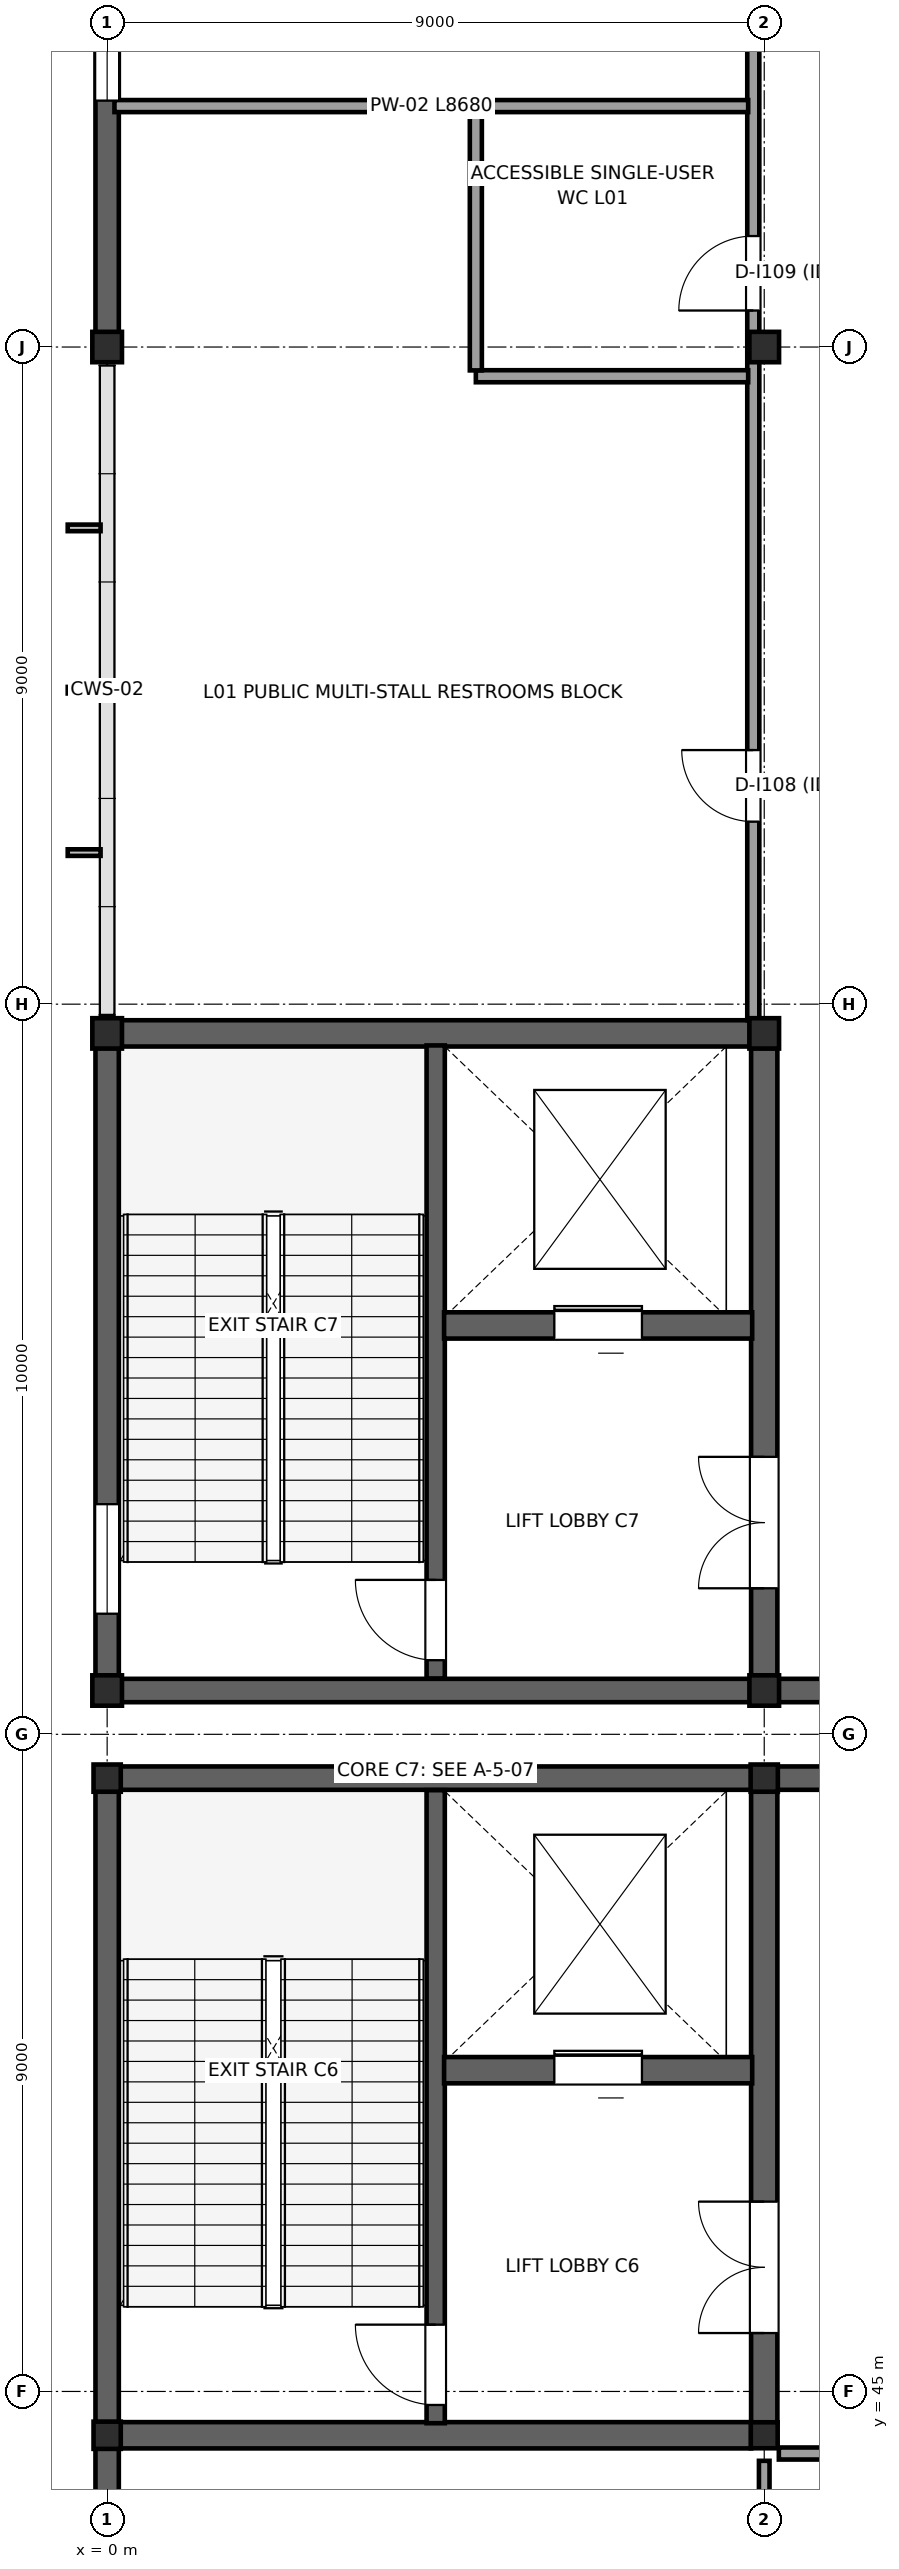
"""IFC4 building model, lengths in metres.
Left out: names, types, materials, properties, quantities, classifications, styles, units other than length and angle.
Written with IfcOpenShell. Run it as: python <this file> out.ifc"""

import sys

from ifc_helpers import new_model, si_unit, direction, frame, frame_2d, origin, origin_2d, place, context, subcontext, project, spatial, rectangle, i_section, extrude, element, fill, save


model = new_model("IFC4")
c1 = context("Model", 3, precision=1e-05, world=origin(), true_north=direction((0.0, 1.0)))
c2 = subcontext(c1, "Body", "Model", "MODEL_VIEW")
j1 = project(units=[si_unit("LENGTHUNIT", "METRE"), si_unit("PLANEANGLEUNIT", "RADIAN")], contexts=[c1])
p1 = place(None, origin())
s1 = spatial("IfcSite", under=j1, at=p1, CompositionType="ELEMENT")
p2 = place(p1, origin())
s2 = spatial("IfcBuilding", under=s1, at=p2, CompositionType="ELEMENT")
p3 = place(p2, frame((0.0, 0.0, 6.0)))
s3 = spatial("IfcBuildingStorey", under=s2, at=p3, CompositionType="ELEMENT", Elevation=6.0)
for number, where, z_axis, x_axis in (
    (1, (9.0, 53.4, 0.0), (0.0, 0.0, 1.0), (1.0, 0.0, 0.0)),
    (2, (0.0, 53.4, 0.0), (0.0, 0.0, 1.0), (1.0, 0.0, 0.0)),
    (3, (0.0, 44.4, 0.0), (0.0, 0.0, 1.0), (1.0, 0.0, 0.0)),
):
    element("IfcColumn", number, at=place(p3, frame(where, z_axis=z_axis, x_axis=x_axis)), inside=s3, PredefinedType="COLUMN", context=c2, shape_type="SweptSolid", body=[
        extrude(i_section(OverallWidth=0.373, OverallDepth=0.373, WebThickness=0.016, FlangeThickness=0.026, at=origin_2d()), origin(), (0.0, 0.0, 1.0), 6.0),
    ])
p4 = place(p3, frame((9.0, 44.4, 0.0), z_axis=(0.0, 0.0, 1.0), x_axis=(1.0, 0.0, 0.0)))
e4 = element("IfcColumn", 4, at=p4, inside=s3, PredefinedType="COLUMN", context=c2, shape_type="SweptSolid", body=[
    extrude(i_section(OverallWidth=0.368, OverallDepth=0.356, WebThickness=0.011, FlangeThickness=0.018, at=origin_2d()), origin(), (0.0, 0.0, 1.0), 6.0),
])
for number, where, z_axis, x_axis in (
    (5, (0.0, 54.6, 0.0), (0.0, 0.0, 1.0), (1.0, 0.0, 0.0)),
    (6, (0.0, 63.6, 0.0), (0.0, 0.0, 1.0), (1.0, 0.0, 0.0)),
    (7, (0.0, 73.0, 0.0), (0.0, 0.0, 1.0), (1.0, 0.0, 0.0)),
    (8, (9.0, 54.6, 0.0), (0.0, 0.0, 1.0), (1.0, 0.0, 0.0)),
    (9, (9.0, 63.6, 0.0), (0.0, 0.0, 1.0), (1.0, 0.0, 0.0)),
    (10, (9.0, 73.0, 0.0), (0.0, 0.0, 1.0), (1.0, 0.0, 0.0)),
):
    element("IfcColumn", number, at=place(p3, frame(where, z_axis=z_axis, x_axis=x_axis)), inside=s3, PredefinedType="COLUMN", context=c2, shape_type="SweptSolid", body=[
        extrude(i_section(OverallWidth=0.406, OverallDepth=0.416, WebThickness=0.03, FlangeThickness=0.048, at=origin_2d()), origin(), (0.0, 0.0, 1.0), 6.0),
    ])
p5 = place(p3, frame((0.0, 36.18, 0.0), z_axis=(0.0, 0.0, 1.0), x_axis=(0.0, 1.0, 0.0)))
e11 = element("IfcWall", 11, at=p5, inside=s3, PredefinedType="STANDARD", context=c2, shape_type="SweptSolid", body=[
    extrude(rectangle(XDim=8.04, YDim=0.32, at=frame_2d((4.02, 0.0))), origin(), (0.0, 0.0, 1.0), 5.75),
])
p6 = place(p3, frame((0.0, 44.58, 0.0), z_axis=(0.0, 0.0, 1.0), x_axis=(0.0, 1.0, 0.0)))
e12 = element("IfcWall", 12, at=p6, inside=s3, PredefinedType="STANDARD", context=c2, shape_type="SweptSolid", body=[
    extrude(rectangle(XDim=8.64, YDim=0.32, at=frame_2d((4.32, 0.0))), origin(), (0.0, 0.0, 1.0), 5.75),
])
for number, where, z_axis, x_axis in (
    (13, (0.015, 53.4, 0.0), (0.0, 0.0, 1.0), (1.0, 0.0, 0.0)),
    (14, (9.015, 53.4, 0.0), (0.0, 0.0, 1.0), (1.0, 0.0, 0.0)),
):
    element("IfcWall", number, at=place(p3, frame(where, z_axis=z_axis, x_axis=x_axis)), inside=s3, PredefinedType="STANDARD", context=c2, shape_type="SweptSolid", body=[
        extrude(rectangle(XDim=8.97, YDim=0.32, at=frame_2d((4.485, 0.0))), origin(), (0.0, 0.0, 1.0), 5.75),
    ])
p7 = place(p3, frame((0.0, 54.802, 0.0), z_axis=(0.0, 0.0, 1.0), x_axis=(0.0, 1.0, 0.0)))
e15 = element("IfcWall", 15, at=p7, inside=s3, PredefinedType="STANDARD", context=c2, shape_type="SweptSolid", body=[
    extrude(rectangle(XDim=8.596, YDim=0.32, at=frame_2d((4.298, 0.0))), origin(), (0.0, 0.0, 1.0), 5.78),
])
p8 = place(p7, frame((0.85, 0.0, 1.1)))
e16 = element("IfcOpeningElement", 16, at=p8, cuts=e15, PredefinedType="OPENING", context=c2, shape_type="SweptSolid", body=[
    extrude(rectangle(XDim=1.5, YDim=1.8, at=frame_2d((0.75, 0.9))), frame((0.0, 0.17, 0.0), z_axis=(0.0, -1.0, 0.0), x_axis=(1.0, 0.0, 0.0)), (0.0, 0.0, 1.0), 0.34),
])
p9 = place(p3, frame((0.0, 73.202, 0.0), z_axis=(0.0, 0.0, 1.0), x_axis=(0.0, 1.0, 0.0)))
e17 = element("IfcWall", 17, at=p9, inside=s3, PredefinedType="STANDARD", context=c2, shape_type="SweptSolid", body=[
    extrude(rectangle(XDim=8.596, YDim=0.32, at=frame_2d((4.298, 0.0))), origin(), (0.0, 0.0, 1.0), 5.78),
])
p10 = place(p9, frame((3.173, 0.0, 1.0)))
e18 = element("IfcOpeningElement", 18, at=p10, cuts=e17, PredefinedType="OPENING", context=c2, shape_type="SweptSolid", body=[
    extrude(rectangle(XDim=2.25, YDim=2.4, at=frame_2d((1.125, 1.2))), frame((0.0, 0.17, 0.0), z_axis=(0.0, -1.0, 0.0), x_axis=(1.0, 0.0, 0.0)), (0.0, 0.0, 1.0), 0.34),
])
for number, where, z_axis, x_axis in (
    (19, (8.978, 54.6, 0.0), (0.0, 0.0, 1.0), (-1.0, 0.0, 0.0)),
    (20, (17.978, 54.6, 0.0), (0.0, 0.0, 1.0), (-1.0, 0.0, 0.0)),
):
    element("IfcWall", number, at=place(p3, frame(where, z_axis=z_axis, x_axis=x_axis)), inside=s3, PredefinedType="STANDARD", context=c2, shape_type="SweptSolid", body=[
        extrude(rectangle(XDim=8.956, YDim=0.32, at=frame_2d((4.478, 0.0))), origin(), (0.0, 0.0, 1.0), 5.78),
    ])
p11 = place(p3, frame((9.0, 44.573, 0.0), z_axis=(0.0, 0.0, 1.0), x_axis=(0.0, 1.0, 0.0)))
e21 = element("IfcWall", 21, at=p11, inside=s3, PredefinedType="SHEAR", context=c2, shape_type="SweptSolid", body=[
    extrude(rectangle(XDim=8.646, YDim=0.36, at=frame_2d((4.323, 0.0))), origin(), (0.0, 0.0, 1.0), 5.75),
])
p12 = place(p11, frame((1.227, 0.0, 0.0)))
e22 = element("IfcOpeningElement", 22, at=p12, cuts=e21, PredefinedType="OPENING", context=c2, shape_type="SweptSolid", body=[
    extrude(rectangle(XDim=1.8, YDim=2.3, at=frame_2d((0.9, 1.15))), frame((0.0, 0.19, 0.0), z_axis=(0.0, -1.0, 0.0), x_axis=(1.0, 0.0, 0.0)), (0.0, 0.0, 1.0), 0.38),
])
p13 = place(p3, frame((0.181, 44.4, 0.0), z_axis=(0.0, 0.0, 1.0), x_axis=(1.0, 0.0, 0.0)))
e23 = element("IfcWall", 23, at=p13, inside=s3, PredefinedType="SHEAR", context=c2, shape_type="SweptSolid", body=[
    extrude(rectangle(XDim=8.64, YDim=0.36, at=frame_2d((4.32, 0.0))), origin(), (0.0, 0.0, 1.0), 5.75),
])
p14 = place(p3, frame((4.5, 44.565, 0.0), z_axis=(0.0, 0.0, 1.0), x_axis=(0.0, 1.0, 0.0)))
e24 = element("IfcWall", 24, at=p14, inside=s3, PredefinedType="SHEAR", context=c2, shape_type="SweptSolid", body=[
    extrude(rectangle(XDim=8.67, YDim=0.25, at=frame_2d((4.335, 0.0))), origin(), (0.0, 0.0, 1.0), 5.75),
])
p15 = place(p14, frame((0.25, 0.0, 0.0)))
e25 = element("IfcOpeningElement", 25, at=p15, cuts=e24, PredefinedType="OPENING", context=c2, shape_type="SweptSolid", body=[
    extrude(rectangle(XDim=1.1, YDim=2.2, at=frame_2d((0.55, 1.1))), frame((0.0, 0.135, 0.0), z_axis=(0.0, -1.0, 0.0), x_axis=(1.0, 0.0, 0.0)), (0.0, 0.0, 1.0), 0.27),
])
p16 = place(p3, frame((4.615, 49.4, 0.0), z_axis=(0.0, 0.0, 1.0), x_axis=(1.0, 0.0, 0.0)))
e26 = element("IfcWall", 26, at=p16, inside=s3, PredefinedType="SHEAR", context=c2, shape_type="SweptSolid", body=[
    extrude(rectangle(XDim=4.22, YDim=0.36, at=frame_2d((2.11, 0.0))), origin(), (0.0, 0.0, 1.0), 5.75),
])
p17 = place(p16, frame((1.51, 0.0, 0.0)))
e27 = element("IfcOpeningElement", 27, at=p17, cuts=e26, PredefinedType="OPENING", context=c2, shape_type="SweptSolid", body=[
    extrude(rectangle(XDim=1.2, YDim=2.3, at=frame_2d((0.6, 1.15))), frame((0.0, 0.19, 0.0), z_axis=(0.0, -1.0, 0.0), x_axis=(1.0, 0.0, 0.0)), (0.0, 0.0, 1.0), 0.38),
])
p18 = place(p3, frame((9.0, 54.803, 0.0), z_axis=(0.0, 0.0, 1.0), x_axis=(0.0, 1.0, 0.0)))
e28 = element("IfcWall", 28, at=p18, inside=s3, PredefinedType="SHEAR", context=c2, shape_type="SweptSolid", body=[
    extrude(rectangle(XDim=8.594, YDim=0.36, at=frame_2d((4.297, 0.0))), origin(), (0.0, 0.0, 1.0), 5.78),
])
p19 = place(p18, frame((1.197, 0.0, 0.0)))
e29 = element("IfcOpeningElement", 29, at=p19, cuts=e28, PredefinedType="OPENING", context=c2, shape_type="SweptSolid", body=[
    extrude(rectangle(XDim=1.8, YDim=2.3, at=frame_2d((0.9, 1.15))), frame((0.0, 0.19, 0.0), z_axis=(0.0, -1.0, 0.0), x_axis=(1.0, 0.0, 0.0)), (0.0, 0.0, 1.0), 0.38),
])
p20 = place(p3, frame((0.198, 63.6, 0.0), z_axis=(0.0, 0.0, 1.0), x_axis=(1.0, 0.0, 0.0)))
e30 = element("IfcWall", 30, at=p20, inside=s3, PredefinedType="SHEAR", context=c2, shape_type="SweptSolid", body=[
    extrude(rectangle(XDim=8.604, YDim=0.36, at=frame_2d((4.302, 0.0))), origin(), (0.0, 0.0, 1.0), 5.78),
])
p21 = place(p3, frame((4.5, 54.765, 0.0), z_axis=(0.0, 0.0, 1.0), x_axis=(0.0, 1.0, 0.0)))
e31 = element("IfcWall", 31, at=p21, inside=s3, PredefinedType="SHEAR", context=c2, shape_type="SweptSolid", body=[
    extrude(rectangle(XDim=8.67, YDim=0.25, at=frame_2d((4.335, 0.0))), origin(), (0.0, 0.0, 1.0), 5.78),
])
p22 = place(p21, frame((0.25, 0.0, 0.0)))
e32 = element("IfcOpeningElement", 32, at=p22, cuts=e31, PredefinedType="OPENING", context=c2, shape_type="SweptSolid", body=[
    extrude(rectangle(XDim=1.1, YDim=2.2, at=frame_2d((0.55, 1.1))), frame((0.0, 0.135, 0.0), z_axis=(0.0, -1.0, 0.0), x_axis=(1.0, 0.0, 0.0)), (0.0, 0.0, 1.0), 0.27),
])
p23 = place(p3, frame((4.615, 59.6, 0.0), z_axis=(0.0, 0.0, 1.0), x_axis=(1.0, 0.0, 0.0)))
e33 = element("IfcWall", 33, at=p23, inside=s3, PredefinedType="SHEAR", context=c2, shape_type="SweptSolid", body=[
    extrude(rectangle(XDim=4.22, YDim=0.36, at=frame_2d((2.11, 0.0))), origin(), (0.0, 0.0, 1.0), 5.78),
])
p24 = place(p23, frame((1.51, 0.0, 0.0)))
e34 = element("IfcOpeningElement", 34, at=p24, cuts=e33, PredefinedType="OPENING", context=c2, shape_type="SweptSolid", body=[
    extrude(rectangle(XDim=1.2, YDim=2.3, at=frame_2d((0.6, 1.15))), frame((0.0, 0.19, 0.0), z_axis=(0.0, -1.0, 0.0), x_axis=(1.0, 0.0, 0.0)), (0.0, 0.0, 1.0), 0.38),
])
p25 = place(p3, frame((8.85, 63.78, 0.0), z_axis=(0.0, 0.0, 1.0), x_axis=(0.0, 1.0, 0.0)))
e35 = element("IfcWall", 35, at=p25, inside=s3, PredefinedType="PARTITIONING", context=c2, shape_type="SweptSolid", body=[
    extrude(rectangle(XDim=27.04, YDim=0.165, at=frame_2d((13.52, 0.0))), origin(), (0.0, 0.0, 1.0), 4.55),
])
p26 = place(p25, frame((2.72, 0.0, 0.0)))
e36 = element("IfcOpeningElement", 36, at=p26, cuts=e35, PredefinedType="OPENING", context=c2, shape_type="SweptSolid", body=[
    extrude(rectangle(XDim=0.98, YDim=2.15, at=frame_2d((0.49, 1.075))), frame((0.0, 0.093, 0.0), z_axis=(0.0, -1.0, 0.0), x_axis=(1.0, 0.0, 0.0)), (0.0, 0.0, 1.0), 0.185),
])
p27 = place(p25, frame((9.72, 0.0, 0.0)))
e37 = element("IfcOpeningElement", 37, at=p27, cuts=e35, PredefinedType="OPENING", context=c2, shape_type="SweptSolid", body=[
    extrude(rectangle(XDim=1.02, YDim=2.16, at=frame_2d((0.51, 1.08))), frame((0.0, 0.093, 0.0), z_axis=(0.0, -1.0, 0.0), x_axis=(1.0, 0.0, 0.0)), (0.0, 0.0, 1.0), 0.185),
])
p28 = place(p25, frame((14.72, 0.0, 0.0)))
e38 = element("IfcOpeningElement", 38, at=p28, cuts=e35, PredefinedType="OPENING", context=c2, shape_type="SweptSolid", body=[
    extrude(rectangle(XDim=0.95, YDim=2.12, at=frame_2d((0.475, 1.06))), frame((0.0, 0.093, 0.0), z_axis=(0.0, -1.0, 0.0), x_axis=(1.0, 0.0, 0.0)), (0.0, 0.0, 1.0), 0.185),
])
p29 = place(p3, frame((5.05, 72.6, 0.0), z_axis=(0.0, 0.0, 1.0), x_axis=(1.0, 0.0, 0.0)))
e39 = element("IfcWall", 39, at=p29, inside=s3, PredefinedType="PARTITIONING", context=c2, shape_type="SweptSolid", body=[
    extrude(rectangle(XDim=3.73, YDim=0.165, at=frame_2d((1.865, 0.0))), origin(), (0.0, 0.0, 1.0), 4.55),
])
p30 = place(p3, frame((5.05, 72.68, 0.0), z_axis=(0.0, 0.0, 1.0), x_axis=(0.0, 1.0, 0.0)))
e40 = element("IfcWall", 40, at=p30, inside=s3, PredefinedType="PARTITIONING", context=c2, shape_type="SweptSolid", body=[
    extrude(rectangle(XDim=3.54, YDim=0.165, at=frame_2d((1.77, 0.0))), origin(), (0.0, 0.0, 1.0), 4.55),
])
p31 = place(p3, frame((0.1, 76.3, 0.0), z_axis=(0.0, 0.0, 1.0), x_axis=(1.0, 0.0, 0.0)))
e41 = element("IfcWall", 41, at=p31, inside=s3, PredefinedType="PARTITIONING", context=c2, shape_type="SweptSolid", body=[
    extrude(rectangle(XDim=8.68, YDim=0.165, at=frame_2d((4.34, 0.0))), origin(), (0.0, 0.0, 1.0), 4.55),
])
p32 = place(p3, frame((9.2, 44.15, 0.0), z_axis=(0.0, 0.0, 1.0), x_axis=(1.0, 0.0, 0.0)))
e42 = element("IfcWall", 42, at=p32, inside=s3, PredefinedType="PARTITIONING", context=c2, shape_type="SweptSolid", body=[
    extrude(rectangle(XDim=8.55, YDim=0.165, at=frame_2d((4.275, 0.0))), origin(), (0.0, 0.0, 1.0), 4.55),
])
p33 = place(p32, frame((2.8, 0.0, 0.0)))
e43 = element("IfcOpeningElement", 43, at=p33, cuts=e42, PredefinedType="OPENING", context=c2, shape_type="SweptSolid", body=[
    extrude(rectangle(XDim=0.98, YDim=2.15, at=frame_2d((0.49, 1.075))), frame((0.0, 0.093, 0.0), z_axis=(0.0, -1.0, 0.0), x_axis=(1.0, 0.0, 0.0)), (0.0, 0.0, 1.0), 0.185),
])
p34 = place(p3, frame((9.0, 27.25, 0.0), z_axis=(0.0, 0.0, 1.0), x_axis=(0.0, 1.0, 0.0)))
e44 = element("IfcWall", 44, at=p34, inside=s3, PredefinedType="PARTITIONING", context=c2, shape_type="SweptSolid", body=[
    extrude(rectangle(XDim=16.8, YDim=0.145, at=frame_2d((8.4, 0.0))), origin(), (0.0, 0.0, 1.0), 4.55),
])
p35 = place(p34, frame((6.0, 0.0, 0.0)))
e45 = element("IfcOpeningElement", 45, at=p35, cuts=e44, PredefinedType="OPENING", context=c2, shape_type="SweptSolid", body=[
    extrude(rectangle(XDim=0.95, YDim=2.12, at=frame_2d((0.475, 1.06))), frame((0.0, 0.083, 0.0), z_axis=(0.0, -1.0, 0.0), x_axis=(1.0, 0.0, 0.0)), (0.0, 0.0, 1.0), 0.165),
])
p36 = place(p8, origin())
e46 = element("IfcWindow", 46, at=p36, inside=s3, PartitioningType="SINGLE_PANEL", PredefinedType="WINDOW", context=c2, shape_type="SweptSolid", body=[
    extrude(rectangle(XDim=1.5, YDim=1.8, at=frame_2d((0.75, 0.9))), frame((0.0, 0.03, 0.0), z_axis=(0.0, -1.0, 0.0), x_axis=(1.0, 0.0, 0.0)), (0.0, 0.0, 1.0), 0.06),
])
fill(e16, e46)
p37 = place(p10, origin())
e47 = element("IfcWindow", 47, at=p37, inside=s3, PartitioningType="SINGLE_PANEL", PredefinedType="WINDOW", context=c2, shape_type="SweptSolid", body=[
    extrude(rectangle(XDim=2.25, YDim=2.4, at=frame_2d((1.125, 1.2))), frame((0.0, 0.03, 0.0), z_axis=(0.0, -1.0, 0.0), x_axis=(1.0, 0.0, 0.0)), (0.0, 0.0, 1.0), 0.06),
])
fill(e18, e47)
p38 = place(p15, origin())
e48 = element("IfcDoor", 48, at=p38, inside=s3, OperationType="SINGLE_SWING_RIGHT", PredefinedType="DOOR", context=c2, shape_type="SweptSolid", body=[
    extrude(rectangle(XDim=1.1, YDim=2.2, at=frame_2d((0.55, 1.1))), frame((0.0, 0.025, 0.0), z_axis=(0.0, -1.0, 0.0), x_axis=(1.0, 0.0, 0.0)), (0.0, 0.0, 1.0), 0.05),
])
fill(e25, e48)
p39 = place(p17, origin())
e49 = element("IfcDoor", 49, at=p39, inside=s3, OperationType="SLIDING_TO_RIGHT", PredefinedType="DOOR", context=c2, shape_type="SweptSolid", body=[
    extrude(rectangle(XDim=1.2, YDim=2.3, at=frame_2d((0.6, 1.15))), frame((0.0, 0.025, 0.0), z_axis=(0.0, -1.0, 0.0), x_axis=(1.0, 0.0, 0.0)), (0.0, 0.0, 1.0), 0.05),
])
fill(e27, e49)
p40 = place(p12, origin())
e50 = element("IfcDoor", 50, at=p40, inside=s3, OperationType="DOUBLE_DOOR_SINGLE_SWING", PredefinedType="DOOR", context=c2, shape_type="SweptSolid", body=[
    extrude(rectangle(XDim=1.8, YDim=2.3, at=frame_2d((0.9, 1.15))), frame((0.0, 0.025, 0.0), z_axis=(0.0, -1.0, 0.0), x_axis=(1.0, 0.0, 0.0)), (0.0, 0.0, 1.0), 0.05),
])
fill(e22, e50)
p41 = place(p22, origin())
e51 = element("IfcDoor", 51, at=p41, inside=s3, OperationType="SINGLE_SWING_RIGHT", PredefinedType="DOOR", context=c2, shape_type="SweptSolid", body=[
    extrude(rectangle(XDim=1.1, YDim=2.2, at=frame_2d((0.55, 1.1))), frame((0.0, 0.025, 0.0), z_axis=(0.0, -1.0, 0.0), x_axis=(1.0, 0.0, 0.0)), (0.0, 0.0, 1.0), 0.05),
])
fill(e32, e51)
p42 = place(p24, origin())
e52 = element("IfcDoor", 52, at=p42, inside=s3, OperationType="SLIDING_TO_RIGHT", PredefinedType="DOOR", context=c2, shape_type="SweptSolid", body=[
    extrude(rectangle(XDim=1.2, YDim=2.3, at=frame_2d((0.6, 1.15))), frame((0.0, 0.025, 0.0), z_axis=(0.0, -1.0, 0.0), x_axis=(1.0, 0.0, 0.0)), (0.0, 0.0, 1.0), 0.05),
])
fill(e34, e52)
p43 = place(p19, origin())
e53 = element("IfcDoor", 53, at=p43, inside=s3, OperationType="DOUBLE_DOOR_SINGLE_SWING", PredefinedType="DOOR", context=c2, shape_type="SweptSolid", body=[
    extrude(rectangle(XDim=1.8, YDim=2.3, at=frame_2d((0.9, 1.15))), frame((0.0, 0.025, 0.0), z_axis=(0.0, -1.0, 0.0), x_axis=(1.0, 0.0, 0.0)), (0.0, 0.0, 1.0), 0.05),
])
fill(e29, e53)
p44 = place(p26, origin())
e54 = element("IfcDoor", 54, at=p44, inside=s3, OperationType="SINGLE_SWING_RIGHT", PredefinedType="DOOR", context=c2, shape_type="SweptSolid", body=[
    extrude(rectangle(XDim=0.98, YDim=2.15, at=frame_2d((0.49, 1.075))), frame((0.0, 0.025, 0.0), z_axis=(0.0, -1.0, 0.0), x_axis=(1.0, 0.0, 0.0)), (0.0, 0.0, 1.0), 0.05),
])
fill(e36, e54)
p45 = place(p27, origin())
e55 = element("IfcDoor", 55, at=p45, inside=s3, OperationType="SINGLE_SWING_LEFT", PredefinedType="DOOR", context=c2, shape_type="SweptSolid", body=[
    extrude(rectangle(XDim=1.02, YDim=2.16, at=frame_2d((0.51, 1.08))), frame((0.0, 0.025, 0.0), z_axis=(0.0, -1.0, 0.0), x_axis=(1.0, 0.0, 0.0)), (0.0, 0.0, 1.0), 0.05),
])
fill(e37, e55)
save(model, sys.argv[1])
